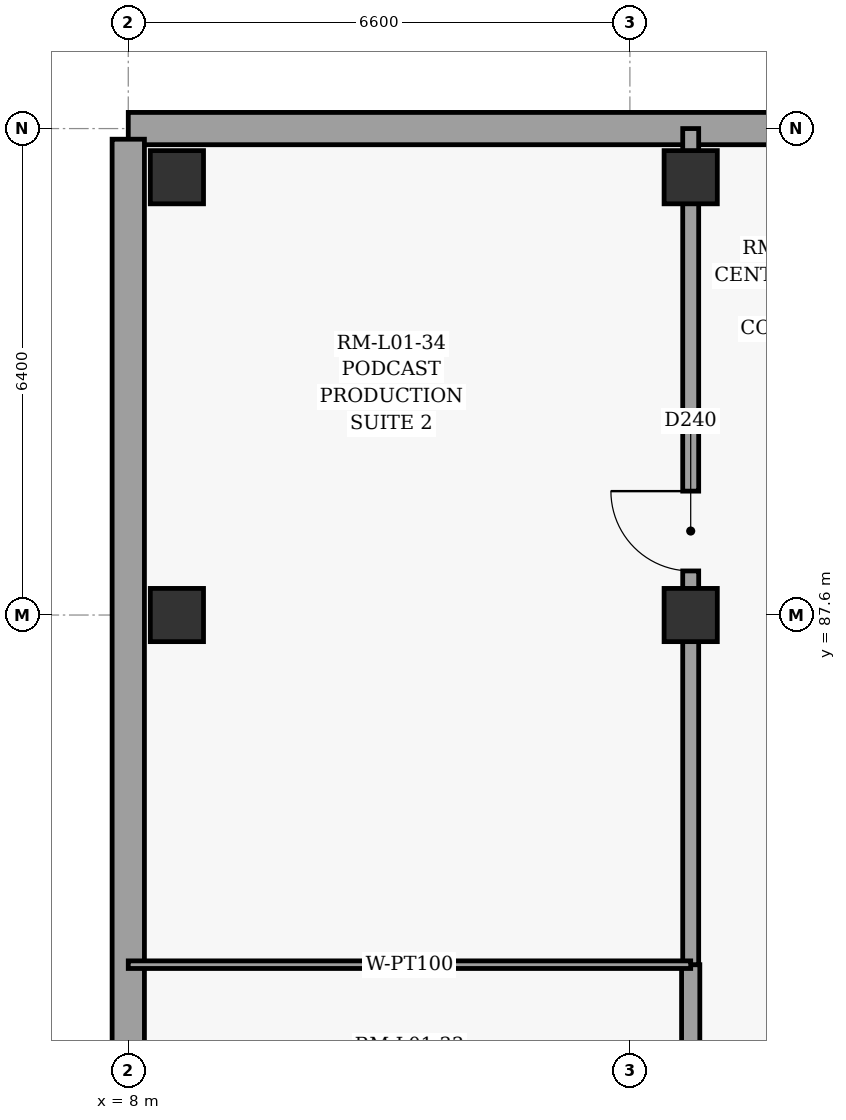
"""IFC4 building model, lengths in metres.
Left out: names, types, materials, properties, quantities, classifications, styles, units other than length and angle.
Written with IfcOpenShell. Run it as: python <this file> out.ifc"""

import sys

from ifc_helpers import new_model, si_unit, direction, frame, frame_2d, origin, origin_2d, place, context, subcontext, project, spatial, rectangle, extrude, element, fill, save


model = new_model("IFC4")
c1 = context("Model", 3, precision=1e-05, world=origin(), true_north=direction((0.0, 1.0)))
c2 = subcontext(c1, "Body", "Model", "MODEL_VIEW")
j1 = project(units=[si_unit("LENGTHUNIT", "METRE"), si_unit("PLANEANGLEUNIT", "RADIAN")], contexts=[c1])
p1 = place(None, origin())
s1 = spatial("IfcSite", under=j1, at=p1, CompositionType="ELEMENT")
p2 = place(p1, origin())
s2 = spatial("IfcBuilding", under=s1, at=p2, CompositionType="ELEMENT")
p3 = place(p2, frame((0.0, 0.0, 5.4)))
s3 = spatial("IfcBuildingStorey", under=s2, at=p3, CompositionType="ELEMENT", Elevation=5.4)
for number, where, z_axis, x_axis in (
    (1, (8.64, 87.6, 0.0), (0.0, 0.0, 1.0), (1.0, 0.0, 0.0)),
    (2, (8.64, 93.36, 0.0), (0.0, 0.0, 1.0), (1.0, 0.0, 0.0)),
    (3, (15.4, 87.6, 0.0), (0.0, 0.0, 1.0), (1.0, 0.0, 0.0)),
    (4, (15.4, 93.36, 0.0), (0.0, 0.0, 1.0), (1.0, 0.0, 0.0)),
):
    element("IfcColumn", number, at=place(p3, frame(where, z_axis=z_axis, x_axis=x_axis)), inside=s3, PredefinedType="COLUMN", context=c2, shape_type="SweptSolid", body=[
        extrude(rectangle(XDim=0.7, YDim=0.7, at=origin_2d()), origin(), (0.0, 0.0, 1.0), 4.8),
    ])
p4 = place(p3, frame((8.0, 94.0, 0.0), z_axis=(0.0, 0.0, 1.0), x_axis=(1.0, 0.0, 0.0)))
e5 = element("IfcWall", 5, at=p4, inside=s3, PredefinedType="SOLIDWALL", context=c2, shape_type="SweptSolid", body=[
    extrude(rectangle(XDim=32.2, YDim=0.425, at=frame_2d((16.1, 0.0))), origin(), (0.0, 0.0, 1.0), 3.075),
])
p5 = place(p3, frame((8.0, 63.818, 0.0), z_axis=(0.0, 0.0, 1.0), x_axis=(0.0, 1.0, 0.0)))
e6 = element("IfcWall", 6, at=p5, inside=s3, PredefinedType="SOLIDWALL", context=c2, shape_type="SweptSolid", body=[
    extrude(rectangle(XDim=30.042, YDim=0.425, at=frame_2d((15.021, 0.0))), origin(), (0.0, 0.0, 1.0), 4.475),
])
p6 = place(p3, frame((15.4, 71.952, 0.0), z_axis=(0.0, 0.0, 1.0), x_axis=(0.0, 1.0, 0.0)))
e7 = element("IfcWall", 7, at=p6, inside=s3, PredefinedType="PARTITIONING", context=c2, shape_type="SweptSolid", body=[
    extrude(rectangle(XDim=11.048, YDim=0.24, at=frame_2d((5.524, 0.0))), origin(), (0.0, 0.0, 1.0), 3.625),
])
p7 = place(p6, frame((5.014, 0.0, 0.0)))
e8 = element("IfcOpeningElement", 8, at=p7, cuts=e7, PredefinedType="OPENING", context=c2, shape_type="SweptSolid", body=[
    extrude(rectangle(XDim=1.02, YDim=2.1, at=frame_2d((0.51, 1.05))), frame((0.0, 0.13, 0.0), z_axis=(0.0, -1.0, 0.0), x_axis=(1.0, 0.0, 0.0)), (0.0, 0.0, 1.0), 0.26),
])
p8 = place(p3, frame((15.4, 83.0, 0.0), z_axis=(0.0, 0.0, 1.0), x_axis=(0.0, 1.0, 0.0)))
e9 = element("IfcWall", 9, at=p8, inside=s3, PredefinedType="PARTITIONING", context=c2, shape_type="SweptSolid", body=[
    extrude(rectangle(XDim=11.0, YDim=0.21, at=frame_2d((5.5, 0.0))), origin(), (0.0, 0.0, 1.0), 3.625),
])
p9 = place(p8, frame((5.18, 0.0, 0.0)))
e10 = element("IfcOpeningElement", 10, at=p9, cuts=e9, PredefinedType="OPENING", context=c2, shape_type="SweptSolid", body=[
    extrude(rectangle(XDim=1.05, YDim=2.15, at=frame_2d((0.525, 1.075))), frame((0.0, 0.115, 0.0), z_axis=(0.0, -1.0, 0.0), x_axis=(1.0, 0.0, 0.0)), (0.0, 0.0, 1.0), 0.23),
])
p10 = place(p3, frame((8.0, 83.0, 0.0), z_axis=(0.0, 0.0, 1.0), x_axis=(1.0, 0.0, 0.0)))
e11 = element("IfcWall", 11, at=p10, inside=s3, PredefinedType="PARTITIONING", context=c2, shape_type="SweptSolid", body=[
    extrude(rectangle(XDim=7.4, YDim=0.1, at=frame_2d((3.7, 0.0))), origin(), (0.0, 0.0, 1.0), 4.475),
])
p11 = place(p9, origin())
e12 = element("IfcDoor", 12, at=p11, inside=s3, OperationType="SINGLE_SWING_RIGHT", PredefinedType="DOOR", context=c2, shape_type="SweptSolid", body=[
    extrude(rectangle(XDim=1.05, YDim=2.15, at=frame_2d((0.525, 1.075))), frame((0.0, 0.025, 0.0), z_axis=(0.0, -1.0, 0.0), x_axis=(1.0, 0.0, 0.0)), (0.0, 0.0, 1.0), 0.05),
])
fill(e10, e12)
save(model, sys.argv[1])
